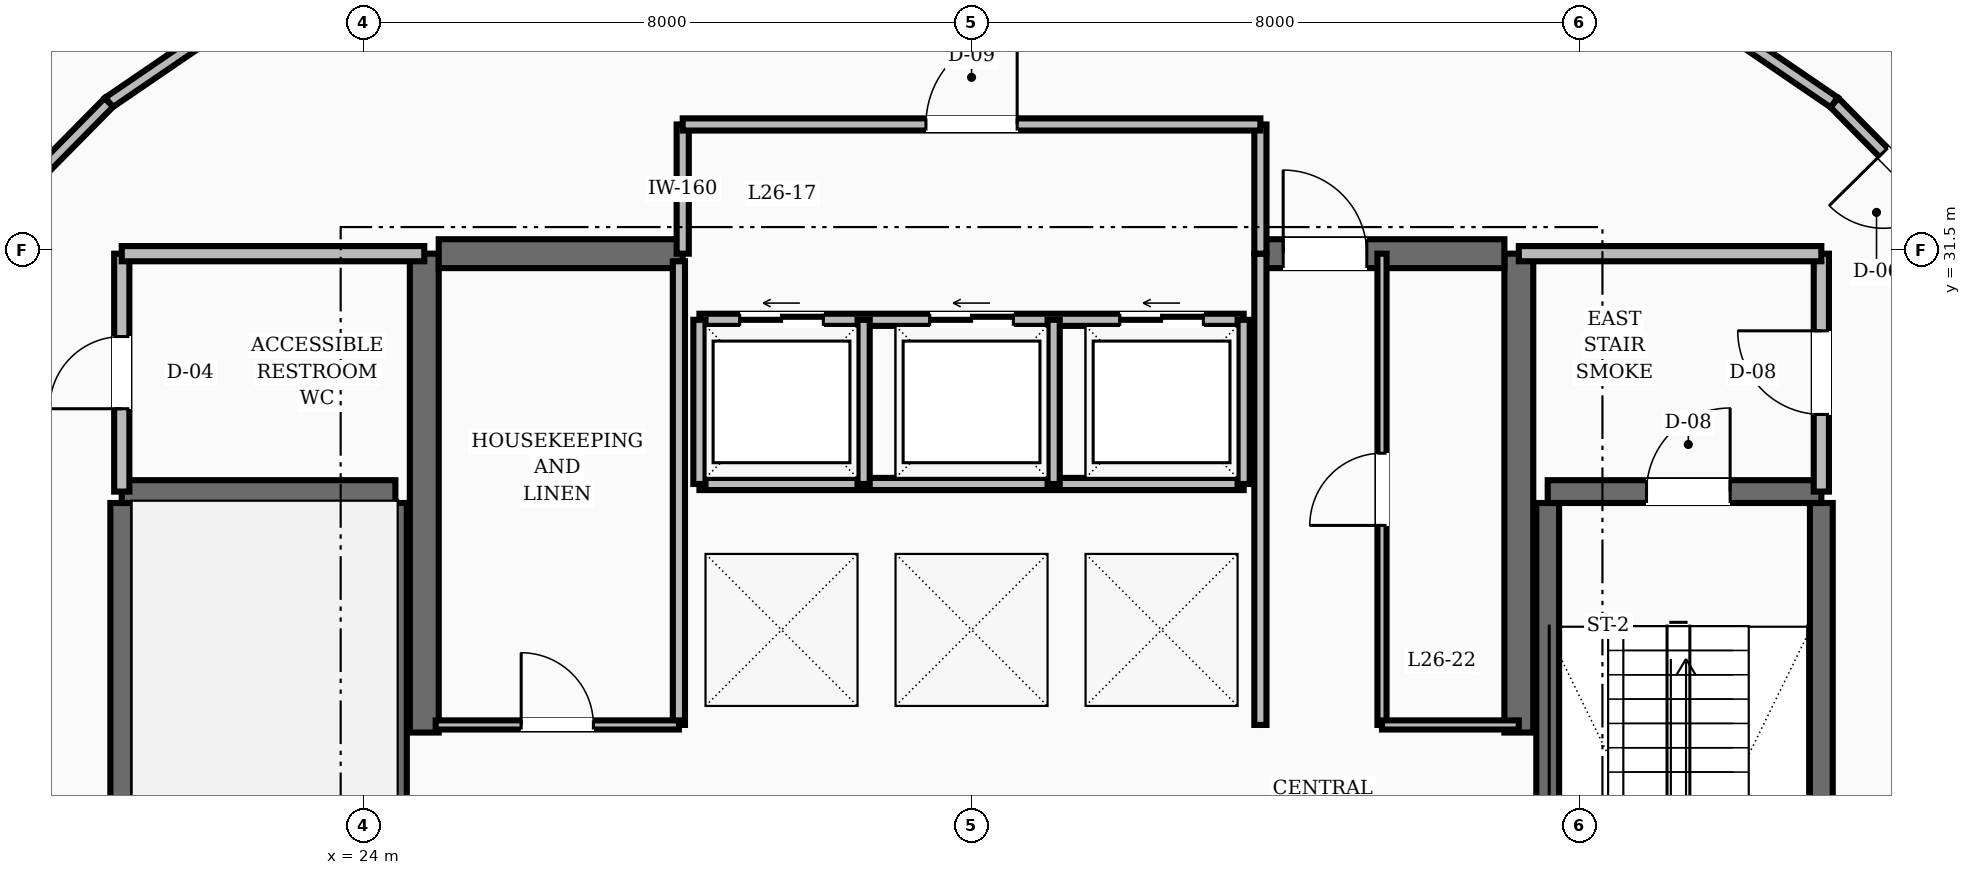
"""IFC4 building model, lengths in metres.
Left out: names, types, materials, properties, quantities, classifications, styles, units other than length and angle.
Written with IfcOpenShell. Run it as: python <this file> out.ifc"""

import sys

from ifc_helpers import new_model, si_unit, direction, frame, frame_2d, origin, place, context, subcontext, project, spatial, rectangle, extrude, element, fill, save


model = new_model("IFC4")
c1 = context("Model", 3, precision=1e-05, world=origin(), true_north=direction((0.0, 1.0)))
c2 = subcontext(c1, "Body", "Model", "MODEL_VIEW")
j1 = project(units=[si_unit("LENGTHUNIT", "METRE"), si_unit("PLANEANGLEUNIT", "RADIAN")], contexts=[c1])
p1 = place(None, origin())
s1 = spatial("IfcSite", under=j1, at=p1, CompositionType="ELEMENT")
p2 = place(p1, origin())
s2 = spatial("IfcBuilding", under=s1, at=p2, CompositionType="ELEMENT")
p3 = place(p2, frame((0.0, 0.0, 102.4)))
s3 = spatial("IfcBuildingStorey", under=s2, at=p3, CompositionType="ELEMENT", Elevation=102.4)
for number, where, z_axis, x_axis in (
    (1, (24.8, 25.15, 0.0), (0.0, 0.0, 1.0), (0.0, 1.0, 0.0)),
    (2, (39.2, 25.15, 0.0), (0.0, 0.0, 1.0), (0.0, 1.0, 0.0)),
):
    element("IfcWall", number, at=place(p3, frame(where, z_axis=z_axis, x_axis=x_axis)), inside=s3, PredefinedType="SHEAR", context=c2, shape_type="SweptSolid", body=[
        extrude(rectangle(XDim=6.3, YDim=0.38, at=frame_2d((3.15, 0.0))), origin(), (0.0, 0.0, 1.0), 3.6),
    ])
p4 = place(p3, frame((24.99, 31.45, 0.0), z_axis=(0.0, 0.0, 1.0), x_axis=(1.0, 0.0, 0.0)))
e3 = element("IfcWall", 3, at=p4, inside=s3, PredefinedType="SHEAR", context=c2, shape_type="SweptSolid", body=[
    extrude(rectangle(XDim=3.21, YDim=0.38, at=frame_2d((1.605, 0.0))), origin(), (0.0, 0.0, 1.0), 3.6),
])
p5 = place(p3, frame((35.8, 31.45, 0.0), z_axis=(0.0, 0.0, 1.0), x_axis=(1.0, 0.0, 0.0)))
e4 = element("IfcWall", 4, at=p5, inside=s3, PredefinedType="SHEAR", context=c2, shape_type="SweptSolid", body=[
    extrude(rectangle(XDim=3.21, YDim=0.38, at=frame_2d((1.605, 0.0))), origin(), (0.0, 0.0, 1.0), 3.6),
])
p6 = place(p5, frame((0.3, 0.0, 0.0)))
e5 = element("IfcOpeningElement", 5, at=p6, cuts=e4, PredefinedType="OPENING", context=c2, shape_type="SweptSolid", body=[
    extrude(rectangle(XDim=1.1, YDim=2.1, at=frame_2d((0.55, 1.05))), frame((0.0, 0.2, 0.0), z_axis=(0.0, -1.0, 0.0), x_axis=(1.0, 0.0, 0.0)), (0.0, 0.0, 1.0), 0.4),
])
for number, where, z_axis, x_axis in (
    (6, (20.82, 19.43, 0.0), (0.0, 0.0, 1.0), (0.0, 1.0, 0.0)),
    (7, (24.42, 19.43, 0.0), (0.0, 0.0, 1.0), (0.0, 1.0, 0.0)),
):
    element("IfcWall", number, at=place(p3, frame(where, z_axis=z_axis, x_axis=x_axis)), inside=s3, PredefinedType="SHEAR", context=c2, shape_type="SweptSolid", body=[
        extrude(rectangle(XDim=8.74, YDim=0.3, at=frame_2d((4.37, 0.0))), origin(), (0.0, 0.0, 1.0), 3.6),
    ])
p7 = place(p3, frame((20.82, 28.32, 0.0), z_axis=(0.0, 0.0, 1.0), x_axis=(1.0, 0.0, 0.0)))
e8 = element("IfcWall", 8, at=p7, inside=s3, PredefinedType="SHEAR", context=c2, shape_type="SweptSolid", body=[
    extrude(rectangle(XDim=3.6, YDim=0.3, at=frame_2d((1.8, 0.0))), origin(), (0.0, 0.0, 1.0), 3.6),
])
for number, where, z_axis, x_axis in (
    (9, (43.18, 19.43, 0.0), (0.0, 0.0, 1.0), (0.0, 1.0, 0.0)),
    (10, (39.58, 19.43, 0.0), (0.0, 0.0, 1.0), (0.0, 1.0, 0.0)),
):
    element("IfcWall", number, at=place(p3, frame(where, z_axis=z_axis, x_axis=x_axis)), inside=s3, PredefinedType="SHEAR", context=c2, shape_type="SweptSolid", body=[
        extrude(rectangle(XDim=8.74, YDim=0.3, at=frame_2d((4.37, 0.0))), origin(), (0.0, 0.0, 1.0), 3.6),
    ])
p8 = place(p3, frame((39.58, 28.32, 0.0), z_axis=(0.0, 0.0, 1.0), x_axis=(1.0, 0.0, 0.0)))
e11 = element("IfcWall", 11, at=p8, inside=s3, PredefinedType="SHEAR", context=c2, shape_type="SweptSolid", body=[
    extrude(rectangle(XDim=3.6, YDim=0.3, at=frame_2d((1.8, 0.0))), origin(), (0.0, 0.0, 1.0), 3.6),
])
p9 = place(p8, frame((1.3, 0.0, 0.0)))
e12 = element("IfcOpeningElement", 12, at=p9, cuts=e11, PredefinedType="OPENING", context=c2, shape_type="SweptSolid", body=[
    extrude(rectangle(XDim=1.1, YDim=2.1, at=frame_2d((0.55, 1.05))), frame((0.0, 0.16, 0.0), z_axis=(0.0, -1.0, 0.0), x_axis=(1.0, 0.0, 0.0)), (0.0, 0.0, 1.0), 0.32),
])
p10 = place(p3, frame((43.18, 28.32, 0.0), z_axis=(0.0, 0.0, 1.0), x_axis=(0.0, 1.0, 0.0)))
e13 = element("IfcWall", 13, at=p10, inside=s3, PredefinedType="SOLIDWALL", context=c2, shape_type="SweptSolid", body=[
    extrude(rectangle(XDim=3.13, YDim=0.2, at=frame_2d((1.565, 0.0))), origin(), (0.0, 0.0, 1.0), 2.67),
])
p11 = place(p10, frame((1.015, 0.0, 0.0)))
e14 = element("IfcOpeningElement", 14, at=p11, cuts=e13, PredefinedType="OPENING", context=c2, shape_type="SweptSolid", body=[
    extrude(rectangle(XDim=1.1, YDim=2.1, at=frame_2d((0.55, 1.05))), frame((0.0, 0.11, 0.0), z_axis=(0.0, -1.0, 0.0), x_axis=(1.0, 0.0, 0.0)), (0.0, 0.0, 1.0), 0.22),
])
p12 = place(p3, frame((39.2, 31.45, 0.0), z_axis=(0.0, 0.0, 1.0), x_axis=(1.0, 0.0, 0.0)))
e15 = element("IfcWall", 15, at=p12, inside=s3, PredefinedType="SOLIDWALL", context=c2, shape_type="SweptSolid", body=[
    extrude(rectangle(XDim=3.98, YDim=0.2, at=frame_2d((1.99, 0.0))), origin(), (0.0, 0.0, 1.0), 2.67),
])
p13 = place(p3, frame((20.82, 28.32, 0.0), z_axis=(0.0, 0.0, 1.0), x_axis=(0.0, 1.0, 0.0)))
e16 = element("IfcWall", 16, at=p13, inside=s3, PredefinedType="SOLIDWALL", context=c2, shape_type="SweptSolid", body=[
    extrude(rectangle(XDim=3.13, YDim=0.2, at=frame_2d((1.565, 0.0))), origin(), (0.0, 0.0, 1.0), 2.67),
])
p14 = place(p13, frame((1.09, 0.0, 0.0)))
e17 = element("IfcOpeningElement", 17, at=p14, cuts=e16, PredefinedType="OPENING", context=c2, shape_type="SweptSolid", body=[
    extrude(rectangle(XDim=0.95, YDim=2.1, at=frame_2d((0.475, 1.05))), frame((0.0, 0.11, 0.0), z_axis=(0.0, -1.0, 0.0), x_axis=(1.0, 0.0, 0.0)), (0.0, 0.0, 1.0), 0.22),
])
p15 = place(p3, frame((20.82, 31.45, 0.0), z_axis=(0.0, 0.0, 1.0), x_axis=(1.0, 0.0, 0.0)))
e18 = element("IfcWall", 18, at=p15, inside=s3, PredefinedType="SOLIDWALL", context=c2, shape_type="SweptSolid", body=[
    extrude(rectangle(XDim=3.98, YDim=0.2, at=frame_2d((1.99, 0.0))), origin(), (0.0, 0.0, 1.0), 2.67),
])
p16 = place(p3, frame((35.8, 25.25, 0.0), z_axis=(0.0, 0.0, 1.0), x_axis=(0.0, 1.0, 0.0)))
e19 = element("IfcWall", 19, at=p16, inside=s3, PredefinedType="SOLIDWALL", context=c2, shape_type="SweptSolid", body=[
    extrude(rectangle(XDim=6.2, YDim=0.16, at=frame_2d((3.1, 0.0))), origin(), (0.0, 0.0, 1.0), 2.67),
])
p17 = place(p3, frame((28.42, 30.58, 0.0), z_axis=(0.0, 0.0, 1.0), x_axis=(1.0, 0.0, 0.0)))
e20 = element("IfcWall", 20, at=p17, inside=s3, PredefinedType="SOLIDWALL", context=c2, shape_type="SweptSolid", body=[
    extrude(rectangle(XDim=7.16, YDim=0.16, at=frame_2d((3.58, 0.0))), origin(), (0.0, 0.0, 1.0), 2.67),
])
p18 = place(p17, frame((0.53, 0.0, 0.0)))
e21 = element("IfcOpeningElement", 21, at=p18, cuts=e20, PredefinedType="OPENING", context=c2, shape_type="SweptSolid", body=[
    extrude(rectangle(XDim=1.1, YDim=2.15, at=frame_2d((0.55, 1.075))), frame((0.0, 0.09, 0.0), z_axis=(0.0, -1.0, 0.0), x_axis=(1.0, 0.0, 0.0)), (0.0, 0.0, 1.0), 0.18),
])
p19 = place(p17, frame((3.03, 0.0, 0.0)))
e22 = element("IfcOpeningElement", 22, at=p19, cuts=e20, PredefinedType="OPENING", context=c2, shape_type="SweptSolid", body=[
    extrude(rectangle(XDim=1.1, YDim=2.15, at=frame_2d((0.55, 1.075))), frame((0.0, 0.09, 0.0), z_axis=(0.0, -1.0, 0.0), x_axis=(1.0, 0.0, 0.0)), (0.0, 0.0, 1.0), 0.18),
])
p20 = place(p17, frame((5.53, 0.0, 0.0)))
e23 = element("IfcOpeningElement", 23, at=p20, cuts=e20, PredefinedType="OPENING", context=c2, shape_type="SweptSolid", body=[
    extrude(rectangle(XDim=1.1, YDim=2.15, at=frame_2d((0.55, 1.075))), frame((0.0, 0.09, 0.0), z_axis=(0.0, -1.0, 0.0), x_axis=(1.0, 0.0, 0.0)), (0.0, 0.0, 1.0), 0.18),
])
p21 = place(p3, frame((28.42, 28.42, 0.0), z_axis=(0.0, 0.0, 1.0), x_axis=(1.0, 0.0, 0.0)))
e24 = element("IfcWall", 24, at=p21, inside=s3, PredefinedType="SOLIDWALL", context=c2, shape_type="SweptSolid", body=[
    extrude(rectangle(XDim=7.16, YDim=0.16, at=frame_2d((3.58, 0.0))), origin(), (0.0, 0.0, 1.0), 2.67),
])
for number, where, z_axis, x_axis in (
    (25, (28.42, 28.42, 0.0), (0.0, 0.0, 1.0), (0.0, 1.0, 0.0)),
    (26, (30.58, 28.42, 0.0), (0.0, 0.0, 1.0), (0.0, 1.0, 0.0)),
    (27, (33.08, 28.42, 0.0), (0.0, 0.0, 1.0), (0.0, 1.0, 0.0)),
    (28, (35.58, 28.42, 0.0), (0.0, 0.0, 1.0), (0.0, 1.0, 0.0)),
):
    element("IfcWall", number, at=place(p3, frame(where, z_axis=z_axis, x_axis=x_axis)), inside=s3, PredefinedType="SOLIDWALL", context=c2, shape_type="SweptSolid", body=[
        extrude(rectangle(XDim=2.16, YDim=0.16, at=frame_2d((1.08, 0.0))), origin(), (0.0, 0.0, 1.0), 2.67),
    ])
for number, where, z_axis, x_axis in (
    (29, (28.2, 31.45, 0.0), (0.0, 0.0, 1.0), (0.0, 1.0, 0.0)),
    (30, (35.8, 31.45, 0.0), (0.0, 0.0, 1.0), (0.0, 1.0, 0.0)),
):
    element("IfcWall", number, at=place(p3, frame(where, z_axis=z_axis, x_axis=x_axis)), inside=s3, PredefinedType="SOLIDWALL", context=c2, shape_type="SweptSolid", body=[
        extrude(rectangle(XDim=1.7, YDim=0.16, at=frame_2d((0.85, 0.0))), origin(), (0.0, 0.0, 1.0), 2.67),
    ])
p22 = place(p3, frame((28.2, 33.15, 0.0), z_axis=(0.0, 0.0, 1.0), x_axis=(1.0, 0.0, 0.0)))
e31 = element("IfcWall", 31, at=p22, inside=s3, PredefinedType="SOLIDWALL", context=c2, shape_type="SweptSolid", body=[
    extrude(rectangle(XDim=7.6, YDim=0.16, at=frame_2d((3.8, 0.0))), origin(), (0.0, 0.0, 1.0), 2.67),
])
p23 = place(p22, frame((3.2, 0.0, 0.0)))
e32 = element("IfcOpeningElement", 32, at=p23, cuts=e31, PredefinedType="OPENING", context=c2, shape_type="SweptSolid", body=[
    extrude(rectangle(XDim=1.2, YDim=2.1, at=frame_2d((0.6, 1.05))), frame((0.0, 0.09, 0.0), z_axis=(0.0, -1.0, 0.0), x_axis=(1.0, 0.0, 0.0)), (0.0, 0.0, 1.0), 0.18),
])
p24 = place(p3, frame((28.15, 25.25, 0.0), z_axis=(0.0, 0.0, 1.0), x_axis=(0.0, 1.0, 0.0)))
e33 = element("IfcWall", 33, at=p24, inside=s3, PredefinedType="SOLIDWALL", context=c2, shape_type="SweptSolid", body=[
    extrude(rectangle(XDim=6.1, YDim=0.16, at=frame_2d((3.05, 0.0))), origin(), (0.0, 0.0, 1.0), 2.67),
])
p25 = place(p3, frame((24.95, 25.25, 0.0), z_axis=(0.0, 0.0, 1.0), x_axis=(1.0, 0.0, 0.0)))
e34 = element("IfcWall", 34, at=p25, inside=s3, PredefinedType="PARTITIONING", context=c2, shape_type="SweptSolid", body=[
    extrude(rectangle(XDim=3.2, YDim=0.12, at=frame_2d((1.6, 0.0))), origin(), (0.0, 0.0, 1.0), 2.67),
])
p26 = place(p25, frame((1.125, 0.0, 0.0)))
e35 = element("IfcOpeningElement", 35, at=p26, cuts=e34, PredefinedType="OPENING", context=c2, shape_type="SweptSolid", body=[
    extrude(rectangle(XDim=0.95, YDim=2.1, at=frame_2d((0.475, 1.05))), frame((0.0, 0.07, 0.0), z_axis=(0.0, -1.0, 0.0), x_axis=(1.0, 0.0, 0.0)), (0.0, 0.0, 1.0), 0.14),
])
p27 = place(p3, frame((37.4, 25.25, 0.0), z_axis=(0.0, 0.0, 1.0), x_axis=(0.0, 1.0, 0.0)))
e36 = element("IfcWall", 36, at=p27, inside=s3, PredefinedType="PARTITIONING", context=c2, shape_type="SweptSolid", body=[
    extrude(rectangle(XDim=6.2, YDim=0.12, at=frame_2d((3.1, 0.0))), origin(), (0.0, 0.0, 1.0), 2.67),
])
p28 = place(p27, frame((2.625, 0.0, 0.0)))
e37 = element("IfcOpeningElement", 37, at=p28, cuts=e36, PredefinedType="OPENING", context=c2, shape_type="SweptSolid", body=[
    extrude(rectangle(XDim=0.95, YDim=2.1, at=frame_2d((0.475, 1.05))), frame((0.0, 0.07, 0.0), z_axis=(0.0, -1.0, 0.0), x_axis=(1.0, 0.0, 0.0)), (0.0, 0.0, 1.0), 0.14),
])
p29 = place(p3, frame((37.4, 25.25, 0.0), z_axis=(0.0, 0.0, 1.0), x_axis=(1.0, 0.0, 0.0)))
e38 = element("IfcWall", 38, at=p29, inside=s3, PredefinedType="PARTITIONING", context=c2, shape_type="SweptSolid", body=[
    extrude(rectangle(XDim=1.8, YDim=0.12, at=frame_2d((0.9, 0.0))), origin(), (0.0, 0.0, 1.0), 2.67),
])
p30 = place(p3, frame((45.345, 31.417, 0.0), z_axis=(0.0, 0.0, 1.0), x_axis=(-0.702366174226, 0.711815816981, 0.0)))
e39 = element("IfcWall", 39, at=p30, inside=s3, PredefinedType="SOLIDWALL", context=c2, shape_type="SweptSolid", body=[
    extrude(rectangle(XDim=2.842, YDim=0.16, at=frame_2d((1.421, 0.0))), origin(), (0.0, 0.0, 1.0), 2.67),
])
p31 = place(p30, frame((0.921, 0.0, 0.0)))
e40 = element("IfcOpeningElement", 40, at=p31, cuts=e39, PredefinedType="OPENING", context=c2, shape_type="SweptSolid", body=[
    extrude(rectangle(XDim=1.0, YDim=2.1, at=frame_2d((0.5, 1.05))), frame((0.0, 0.09, 0.0), z_axis=(0.0, -1.0, 0.0), x_axis=(1.0, 0.0, 0.0)), (0.0, 0.0, 1.0), 0.18),
])
for number, where, z_axis, x_axis in (
    (41, (43.349, 33.44, 0.0), (0.0, 0.0, 1.0), (-0.826, 0.564, 0.0)),
    (42, (23.083, 35.1, 0.0), (0.0, 0.0, 1.0), (-0.826, -0.564, 0.0)),
):
    element("IfcWall", number, at=place(p3, frame(where, z_axis=z_axis, x_axis=x_axis)), inside=s3, PredefinedType="SOLIDWALL", context=c2, shape_type="SweptSolid", body=[
        extrude(rectangle(XDim=2.945, YDim=0.16, at=frame_2d((1.472, 0.0))), origin(), (0.0, 0.0, 1.0), 2.67),
    ])
p32 = place(p3, frame((20.651, 33.44, 0.0), z_axis=(0.0, 0.0, 1.0), x_axis=(-0.702366174226, -0.711815816981, 0.0)))
e43 = element("IfcWall", 43, at=p32, inside=s3, PredefinedType="SOLIDWALL", context=c2, shape_type="SweptSolid", body=[
    extrude(rectangle(XDim=2.842, YDim=0.16, at=frame_2d((1.421, 0.0))), origin(), (0.0, 0.0, 1.0), 2.67),
])
p33 = place(p9, origin())
e44 = element("IfcDoor", 44, at=p33, inside=s3, OperationType="SINGLE_SWING_RIGHT", PredefinedType="DOOR", context=c2, shape_type="SweptSolid", body=[
    extrude(rectangle(XDim=1.1, YDim=2.1, at=frame_2d((0.55, 1.05))), frame((0.0, 0.025, 0.0), z_axis=(0.0, -1.0, 0.0), x_axis=(1.0, 0.0, 0.0)), (0.0, 0.0, 1.0), 0.05),
])
fill(e12, e44)
p34 = place(p11, origin())
e45 = element("IfcDoor", 45, at=p34, inside=s3, OperationType="SINGLE_SWING_RIGHT", PredefinedType="DOOR", context=c2, shape_type="SweptSolid", body=[
    extrude(rectangle(XDim=1.1, YDim=2.1, at=frame_2d((0.55, 1.05))), frame((0.0, 0.025, 0.0), z_axis=(0.0, -1.0, 0.0), x_axis=(1.0, 0.0, 0.0)), (0.0, 0.0, 1.0), 0.05),
])
fill(e14, e45)
p35 = place(p14, origin())
e46 = element("IfcDoor", 46, at=p35, inside=s3, OperationType="SINGLE_SWING_LEFT", PredefinedType="DOOR", context=c2, shape_type="SweptSolid", body=[
    extrude(rectangle(XDim=0.95, YDim=2.1, at=frame_2d((0.475, 1.05))), frame((0.0, 0.025, 0.0), z_axis=(0.0, -1.0, 0.0), x_axis=(1.0, 0.0, 0.0)), (0.0, 0.0, 1.0), 0.05),
])
fill(e17, e46)
p36 = place(p6, origin())
e47 = element("IfcDoor", 47, at=p36, inside=s3, OperationType="SINGLE_SWING_LEFT", PredefinedType="DOOR", context=c2, shape_type="SweptSolid", body=[
    extrude(rectangle(XDim=1.1, YDim=2.1, at=frame_2d((0.55, 1.05))), frame((0.0, 0.025, 0.0), z_axis=(0.0, -1.0, 0.0), x_axis=(1.0, 0.0, 0.0)), (0.0, 0.0, 1.0), 0.05),
])
fill(e5, e47)
p37 = place(p18, origin())
e48 = element("IfcDoor", 48, at=p37, inside=s3, OperationType="SLIDING_TO_LEFT", PredefinedType="DOOR", context=c2, shape_type="SweptSolid", body=[
    extrude(rectangle(XDim=1.1, YDim=2.15, at=frame_2d((0.55, 1.075))), frame((0.0, 0.025, 0.0), z_axis=(0.0, -1.0, 0.0), x_axis=(1.0, 0.0, 0.0)), (0.0, 0.0, 1.0), 0.05),
])
fill(e21, e48)
p38 = place(p19, origin())
e49 = element("IfcDoor", 49, at=p38, inside=s3, OperationType="SLIDING_TO_LEFT", PredefinedType="DOOR", context=c2, shape_type="SweptSolid", body=[
    extrude(rectangle(XDim=1.1, YDim=2.15, at=frame_2d((0.55, 1.075))), frame((0.0, 0.025, 0.0), z_axis=(0.0, -1.0, 0.0), x_axis=(1.0, 0.0, 0.0)), (0.0, 0.0, 1.0), 0.05),
])
fill(e22, e49)
p39 = place(p20, origin())
e50 = element("IfcDoor", 50, at=p39, inside=s3, OperationType="SLIDING_TO_LEFT", PredefinedType="DOOR", context=c2, shape_type="SweptSolid", body=[
    extrude(rectangle(XDim=1.1, YDim=2.15, at=frame_2d((0.55, 1.075))), frame((0.0, 0.025, 0.0), z_axis=(0.0, -1.0, 0.0), x_axis=(1.0, 0.0, 0.0)), (0.0, 0.0, 1.0), 0.05),
])
fill(e23, e50)
p40 = place(p23, origin())
e51 = element("IfcDoor", 51, at=p40, inside=s3, OperationType="SINGLE_SWING_RIGHT", PredefinedType="DOOR", context=c2, shape_type="SweptSolid", body=[
    extrude(rectangle(XDim=1.2, YDim=2.1, at=frame_2d((0.6, 1.05))), frame((0.0, 0.025, 0.0), z_axis=(0.0, -1.0, 0.0), x_axis=(1.0, 0.0, 0.0)), (0.0, 0.0, 1.0), 0.05),
])
fill(e32, e51)
p41 = place(p26, origin())
e52 = element("IfcDoor", 52, at=p41, inside=s3, OperationType="SINGLE_SWING_LEFT", PredefinedType="DOOR", context=c2, shape_type="SweptSolid", body=[
    extrude(rectangle(XDim=0.95, YDim=2.1, at=frame_2d((0.475, 1.05))), frame((0.0, 0.025, 0.0), z_axis=(0.0, -1.0, 0.0), x_axis=(1.0, 0.0, 0.0)), (0.0, 0.0, 1.0), 0.05),
])
fill(e35, e52)
p42 = place(p28, origin())
e53 = element("IfcDoor", 53, at=p42, inside=s3, OperationType="SINGLE_SWING_LEFT", PredefinedType="DOOR", context=c2, shape_type="SweptSolid", body=[
    extrude(rectangle(XDim=0.95, YDim=2.1, at=frame_2d((0.475, 1.05))), frame((0.0, 0.025, 0.0), z_axis=(0.0, -1.0, 0.0), x_axis=(1.0, 0.0, 0.0)), (0.0, 0.0, 1.0), 0.05),
])
fill(e37, e53)
p43 = place(p31, origin())
e54 = element("IfcDoor", 54, at=p43, inside=s3, OperationType="SINGLE_SWING_RIGHT", PredefinedType="DOOR", context=c2, shape_type="SweptSolid", body=[
    extrude(rectangle(XDim=1.0, YDim=2.1, at=frame_2d((0.5, 1.05))), frame((0.0, 0.025, 0.0), z_axis=(0.0, -1.0, 0.0), x_axis=(1.0, 0.0, 0.0)), (0.0, 0.0, 1.0), 0.05),
])
fill(e40, e54)
save(model, sys.argv[1])
